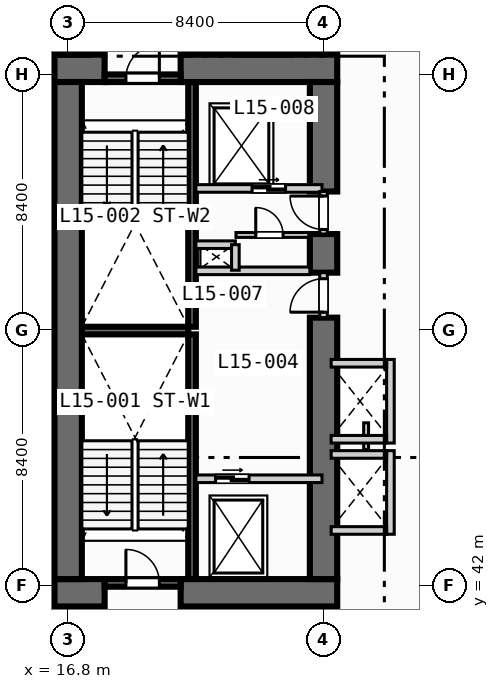
"""IFC4 building model, lengths in metres.
Left out: names, types, materials, properties, quantities, classifications, styles, units other than length and angle.
Written with IfcOpenShell. Run it as: python <this file> out.ifc"""

import sys

from ifc_helpers import new_model, si_unit, direction, frame, frame_2d, origin, place, context, subcontext, project, spatial, rectangle, extrude, element, fill, save


model = new_model("IFC4")
c1 = context("Model", 3, precision=1e-05, world=origin(), true_north=direction((0.0, 1.0)))
c2 = subcontext(c1, "Body", "Model", "MODEL_VIEW")
j1 = project(units=[si_unit("LENGTHUNIT", "METRE"), si_unit("PLANEANGLEUNIT", "RADIAN")], contexts=[c1])
p1 = place(None, origin())
s1 = spatial("IfcSite", under=j1, at=p1, CompositionType="ELEMENT")
p2 = place(p1, origin())
s2 = spatial("IfcBuilding", under=s1, at=p2, CompositionType="ELEMENT")
p3 = place(p2, frame((0.0, 0.0, 66.2)))
s3 = spatial("IfcBuildingStorey", under=s2, at=p3, CompositionType="ELEMENT", Elevation=66.2)
for number, where, z_axis, x_axis in (
    (1, (20.875, 42.2, 0.0), (0.0, 0.0, 1.0), (0.0, 1.0, 0.0)),
    (2, (20.875, 50.5, 0.0), (0.0, 0.0, 1.0), (0.0, 1.0, 0.0)),
):
    element("IfcWall", number, at=place(p3, frame(where, z_axis=z_axis, x_axis=x_axis)), inside=s3, PredefinedType="SOLIDWALL", context=c2, shape_type="SweptSolid", body=[
        extrude(rectangle(XDim=8.05, YDim=0.25, at=frame_2d((4.025, 0.0))), origin(), (0.0, 0.0, 1.0), 3.55),
    ])
p4 = place(p3, frame((17.25, 50.375, 0.0), z_axis=(0.0, 0.0, 1.0), x_axis=(1.0, 0.0, 0.0)))
e3 = element("IfcWall", 3, at=p4, inside=s3, PredefinedType="SOLIDWALL", context=c2, shape_type="SweptSolid", body=[
    extrude(rectangle(XDim=3.5, YDim=0.25, at=frame_2d((1.75, 0.0))), origin(), (0.0, 0.0, 1.0), 3.55),
])
p5 = place(p3, frame((16.35, 41.75, 0.0), z_axis=(0.0, 0.0, 1.0), x_axis=(1.0, 0.0, 0.0)))
e4 = element("IfcWall", 4, at=p5, inside=s3, PredefinedType="SHEAR", context=c2, shape_type="SweptSolid", body=[
    extrude(rectangle(XDim=1.65, YDim=0.9, at=frame_2d((0.825, 0.0))), origin(), (0.0, 0.0, 1.0), 3.55),
])
p6 = place(p3, frame((20.5, 41.75, 0.0), z_axis=(0.0, 0.0, 1.0), x_axis=(1.0, 0.0, 0.0)))
e5 = element("IfcWall", 5, at=p6, inside=s3, PredefinedType="SHEAR", context=c2, shape_type="SweptSolid", body=[
    extrude(rectangle(XDim=5.15, YDim=0.9, at=frame_2d((2.575, 0.0))), origin(), (0.0, 0.0, 1.0), 3.55),
])
p7 = place(p3, frame((16.35, 59.0, 0.0), z_axis=(0.0, 0.0, 1.0), x_axis=(1.0, 0.0, 0.0)))
e6 = element("IfcWall", 6, at=p7, inside=s3, PredefinedType="SHEAR", context=c2, shape_type="SweptSolid", body=[
    extrude(rectangle(XDim=1.65, YDim=0.9, at=frame_2d((0.825, 0.0))), origin(), (0.0, 0.0, 1.0), 3.55),
])
p8 = place(p3, frame((20.5, 59.0, 0.0), z_axis=(0.0, 0.0, 1.0), x_axis=(1.0, 0.0, 0.0)))
e7 = element("IfcWall", 7, at=p8, inside=s3, PredefinedType="SHEAR", context=c2, shape_type="SweptSolid", body=[
    extrude(rectangle(XDim=5.15, YDim=0.9, at=frame_2d((2.575, 0.0))), origin(), (0.0, 0.0, 1.0), 3.55),
])
p9 = place(p3, frame((16.8, 42.2, 0.0), z_axis=(0.0, 0.0, 1.0), x_axis=(0.0, 1.0, 0.0)))
e8 = element("IfcWall", 8, at=p9, inside=s3, PredefinedType="SHEAR", context=c2, shape_type="SweptSolid", body=[
    extrude(rectangle(XDim=16.35, YDim=0.9, at=frame_2d((8.175, 0.0))), origin(), (0.0, 0.0, 1.0), 3.55),
])
p10 = place(p3, frame((25.2, 42.2, 0.0), z_axis=(0.0, 0.0, 1.0), x_axis=(0.0, 1.0, 0.0)))
e9 = element("IfcWall", 9, at=p10, inside=s3, PredefinedType="SHEAR", context=c2, shape_type="SweptSolid", body=[
    extrude(rectangle(XDim=8.6, YDim=0.9, at=frame_2d((4.3, 0.0))), origin(), (0.0, 0.0, 1.0), 3.55),
])
p11 = place(p3, frame((25.2, 52.28, 0.0), z_axis=(0.0, 0.0, 1.0), x_axis=(0.0, 1.0, 0.0)))
e10 = element("IfcWall", 10, at=p11, inside=s3, PredefinedType="SHEAR", context=c2, shape_type="SweptSolid", body=[
    extrude(rectangle(XDim=1.27, YDim=0.9, at=frame_2d((0.635, 0.0))), origin(), (0.0, 0.0, 1.0), 3.55),
])
p12 = place(p3, frame((25.2, 54.95, 0.0), z_axis=(0.0, 0.0, 1.0), x_axis=(0.0, 1.0, 0.0)))
e11 = element("IfcWall", 11, at=p12, inside=s3, PredefinedType="SHEAR", context=c2, shape_type="SweptSolid", body=[
    extrude(rectangle(XDim=3.6, YDim=0.9, at=frame_2d((1.8, 0.0))), origin(), (0.0, 0.0, 1.0), 3.55),
])
p13 = place(p3, frame((18.0, 42.075, 0.0), z_axis=(0.0, 0.0, 1.0), x_axis=(1.0, 0.0, 0.0)))
e12 = element("IfcWall", 12, at=p13, inside=s3, PredefinedType="SOLIDWALL", context=c2, shape_type="SweptSolid", body=[
    extrude(rectangle(XDim=2.5, YDim=0.25, at=frame_2d((1.25, 0.0))), origin(), (0.0, 0.0, 1.0), 3.55),
])
p14 = place(p13, frame((0.7, 0.0, 0.0)))
e13 = element("IfcOpeningElement", 13, at=p14, cuts=e12, PredefinedType="OPENING", context=c2, shape_type="SweptSolid", body=[
    extrude(rectangle(XDim=1.1, YDim=2.15, at=frame_2d((0.55, 1.075))), frame((0.0, 0.135, 0.0), z_axis=(0.0, -1.0, 0.0), x_axis=(1.0, 0.0, 0.0)), (0.0, 0.0, 1.0), 0.27),
])
p15 = place(p3, frame((18.0, 58.675, 0.0), z_axis=(0.0, 0.0, 1.0), x_axis=(1.0, 0.0, 0.0)))
e14 = element("IfcWall", 14, at=p15, inside=s3, PredefinedType="SOLIDWALL", context=c2, shape_type="SweptSolid", body=[
    extrude(rectangle(XDim=2.5, YDim=0.25, at=frame_2d((1.25, 0.0))), origin(), (0.0, 0.0, 1.0), 3.55),
])
p16 = place(p15, frame((0.7, 0.0, 0.0)))
e15 = element("IfcOpeningElement", 15, at=p16, cuts=e14, PredefinedType="OPENING", context=c2, shape_type="SweptSolid", body=[
    extrude(rectangle(XDim=1.1, YDim=2.15, at=frame_2d((0.55, 1.075))), frame((0.0, 0.135, 0.0), z_axis=(0.0, -1.0, 0.0), x_axis=(1.0, 0.0, 0.0)), (0.0, 0.0, 1.0), 0.27),
])
p17 = place(p3, frame((21.0, 45.5, 0.0), z_axis=(0.0, 0.0, 1.0), x_axis=(1.0, 0.0, 0.0)))
e16 = element("IfcWall", 16, at=p17, inside=s3, PredefinedType="SOLIDWALL", context=c2, shape_type="SweptSolid", body=[
    extrude(rectangle(XDim=4.15, YDim=0.25, at=frame_2d((2.075, 0.0))), origin(), (0.0, 0.0, 1.0), 3.55),
])
p18 = place(p17, frame((0.65, 0.0, 0.0)))
e17 = element("IfcOpeningElement", 17, at=p18, cuts=e16, PredefinedType="OPENING", context=c2, shape_type="SweptSolid", body=[
    extrude(rectangle(XDim=1.1, YDim=2.15, at=frame_2d((0.55, 1.075))), frame((0.0, 0.135, 0.0), z_axis=(0.0, -1.0, 0.0), x_axis=(1.0, 0.0, 0.0)), (0.0, 0.0, 1.0), 0.27),
])
p19 = place(p3, frame((25.2, 50.8, 0.0), z_axis=(0.0, 0.0, 1.0), x_axis=(0.0, 1.0, 0.0)))
e18 = element("IfcWall", 18, at=p19, inside=s3, PredefinedType="SOLIDWALL", context=c2, shape_type="SweptSolid", body=[
    extrude(rectangle(XDim=1.48, YDim=0.25, at=frame_2d((0.74, 0.0))), origin(), (0.0, 0.0, 1.0), 3.55),
])
p20 = place(p19, frame((0.18, 0.0, 0.0)))
e19 = element("IfcOpeningElement", 19, at=p20, cuts=e18, PredefinedType="OPENING", context=c2, shape_type="SweptSolid", body=[
    extrude(rectangle(XDim=1.1, YDim=2.15, at=frame_2d((0.55, 1.075))), frame((0.0, 0.135, 0.0), z_axis=(0.0, -1.0, 0.0), x_axis=(1.0, 0.0, 0.0)), (0.0, 0.0, 1.0), 0.27),
])
p21 = place(p3, frame((21.0, 52.34, 0.0), z_axis=(0.0, 0.0, 1.0), x_axis=(1.0, 0.0, 0.0)))
e20 = element("IfcWall", 20, at=p21, inside=s3, PredefinedType="SOLIDWALL", context=c2, shape_type="SweptSolid", body=[
    extrude(rectangle(XDim=3.75, YDim=0.25, at=frame_2d((1.875, 0.0))), origin(), (0.0, 0.0, 1.0), 3.55),
])
p22 = place(p3, frame((21.0, 55.05, 0.0), z_axis=(0.0, 0.0, 1.0), x_axis=(1.0, 0.0, 0.0)))
e21 = element("IfcWall", 21, at=p22, inside=s3, PredefinedType="SOLIDWALL", context=c2, shape_type="SweptSolid", body=[
    extrude(rectangle(XDim=4.15, YDim=0.25, at=frame_2d((2.075, 0.0))), origin(), (0.0, 0.0, 1.0), 3.55),
])
p23 = place(p22, frame((1.85, 0.0, 0.0)))
e22 = element("IfcOpeningElement", 22, at=p23, cuts=e21, PredefinedType="OPENING", context=c2, shape_type="SweptSolid", body=[
    extrude(rectangle(XDim=1.1, YDim=2.15, at=frame_2d((0.55, 1.075))), frame((0.0, 0.135, 0.0), z_axis=(0.0, -1.0, 0.0), x_axis=(1.0, 0.0, 0.0)), (0.0, 0.0, 1.0), 0.27),
])
p24 = place(p3, frame((25.2, 53.55, 0.0), z_axis=(0.0, 0.0, 1.0), x_axis=(0.0, 1.0, 0.0)))
e23 = element("IfcWall", 23, at=p24, inside=s3, PredefinedType="SOLIDWALL", context=c2, shape_type="SweptSolid", body=[
    extrude(rectangle(XDim=1.4, YDim=0.25, at=frame_2d((0.7, 0.0))), origin(), (0.0, 0.0, 1.0), 3.55),
])
p25 = place(p24, frame((0.15, 0.0, 0.0)))
e24 = element("IfcOpeningElement", 24, at=p25, cuts=e23, PredefinedType="OPENING", context=c2, shape_type="SweptSolid", body=[
    extrude(rectangle(XDim=1.1, YDim=2.15, at=frame_2d((0.55, 1.075))), frame((0.0, 0.135, 0.0), z_axis=(0.0, -1.0, 0.0), x_axis=(1.0, 0.0, 0.0)), (0.0, 0.0, 1.0), 0.27),
])
p26 = place(p3, frame((21.0, 53.2, 0.0), z_axis=(0.0, 0.0, 1.0), x_axis=(1.0, 0.0, 0.0)))
e25 = element("IfcWall", 25, at=p26, inside=s3, PredefinedType="SOLIDWALL", context=c2, shape_type="SweptSolid", body=[
    extrude(rectangle(XDim=1.3, YDim=0.25, at=frame_2d((0.65, 0.0))), origin(), (0.0, 0.0, 1.0), 3.55),
])
p27 = place(p3, frame((22.3, 52.36, 0.0), z_axis=(0.0, 0.0, 1.0), x_axis=(0.0, 1.0, 0.0)))
e26 = element("IfcWall", 26, at=p27, inside=s3, PredefinedType="SOLIDWALL", context=c2, shape_type="SweptSolid", body=[
    extrude(rectangle(XDim=0.84, YDim=0.25, at=frame_2d((0.42, 0.0))), origin(), (0.0, 0.0, 1.0), 3.55),
])
p28 = place(p3, frame((22.32, 53.52, 0.0), z_axis=(0.0, 0.0, 1.0), x_axis=(1.0, 0.0, 0.0)))
e27 = element("IfcWall", 27, at=p28, inside=s3, PredefinedType="PARTITIONING", context=c2, shape_type="SweptSolid", body=[
    extrude(rectangle(XDim=2.4, YDim=0.16, at=frame_2d((1.2, 0.0))), origin(), (0.0, 0.0, 1.0), 3.55),
])
p29 = place(p28, frame((0.65, 0.0, 0.0)))
e28 = element("IfcOpeningElement", 28, at=p29, cuts=e27, PredefinedType="OPENING", context=c2, shape_type="SweptSolid", body=[
    extrude(rectangle(XDim=0.9, YDim=2.1, at=frame_2d((0.45, 1.05))), frame((0.0, 0.09, 0.0), z_axis=(0.0, -1.0, 0.0), x_axis=(1.0, 0.0, 0.0)), (0.0, 0.0, 1.0), 0.18),
])
p30 = place(p3, frame((27.4, 43.675, 0.0), z_axis=(0.0, 0.0, 1.0), x_axis=(0.0, 1.0, 0.0)))
e29 = element("IfcWall", 29, at=p30, inside=s3, PredefinedType="SOLIDWALL", context=c2, shape_type="SweptSolid", body=[
    extrude(rectangle(XDim=2.75, YDim=0.25, at=frame_2d((1.375, 0.0))), origin(), (0.0, 0.0, 1.0), 3.55),
])
for number, where, z_axis, x_axis in (
    (30, (25.45, 43.8, 0.0), (0.0, 0.0, 1.0), (1.0, 0.0, 0.0)),
    (31, (25.45, 46.3, 0.0), (0.0, 0.0, 1.0), (1.0, 0.0, 0.0)),
):
    element("IfcWall", number, at=place(p3, frame(where, z_axis=z_axis, x_axis=x_axis)), inside=s3, PredefinedType="SOLIDWALL", context=c2, shape_type="SweptSolid", body=[
        extrude(rectangle(XDim=1.825, YDim=0.25, at=frame_2d((0.913, 0.0))), origin(), (0.0, 0.0, 1.0), 3.55),
    ])
p31 = place(p3, frame((26.6, 46.46, 0.0), z_axis=(0.0, 0.0, 1.0), x_axis=(0.0, 1.0, 0.0)))
e32 = element("IfcWall", 32, at=p31, inside=s3, PredefinedType="PARTITIONING", context=c2, shape_type="SweptSolid", body=[
    extrude(rectangle(XDim=0.88, YDim=0.16, at=frame_2d((0.44, 0.0))), origin(), (0.0, 0.0, 1.0), 3.55),
])
p32 = place(p3, frame((27.4, 46.675, 0.0), z_axis=(0.0, 0.0, 1.0), x_axis=(0.0, 1.0, 0.0)))
e33 = element("IfcWall", 33, at=p32, inside=s3, PredefinedType="SOLIDWALL", context=c2, shape_type="SweptSolid", body=[
    extrude(rectangle(XDim=2.75, YDim=0.25, at=frame_2d((1.375, 0.0))), origin(), (0.0, 0.0, 1.0), 3.55),
])
for number, where, z_axis, x_axis in (
    (34, (25.45, 46.8, 0.0), (0.0, 0.0, 1.0), (1.0, 0.0, 0.0)),
    (35, (25.45, 49.3, 0.0), (0.0, 0.0, 1.0), (1.0, 0.0, 0.0)),
):
    element("IfcWall", number, at=place(p3, frame(where, z_axis=z_axis, x_axis=x_axis)), inside=s3, PredefinedType="SOLIDWALL", context=c2, shape_type="SweptSolid", body=[
        extrude(rectangle(XDim=1.825, YDim=0.25, at=frame_2d((0.913, 0.0))), origin(), (0.0, 0.0, 1.0), 3.55),
    ])
p33 = place(p14, origin())
e36 = element("IfcDoor", 36, at=p33, inside=s3, OperationType="SINGLE_SWING_LEFT", PredefinedType="DOOR", context=c2, shape_type="SweptSolid", body=[
    extrude(rectangle(XDim=1.1, YDim=2.15, at=frame_2d((0.55, 1.075))), frame((0.0, 0.025, 0.0), z_axis=(0.0, -1.0, 0.0), x_axis=(1.0, 0.0, 0.0)), (0.0, 0.0, 1.0), 0.05),
])
fill(e13, e36)
p34 = place(p16, origin())
e37 = element("IfcDoor", 37, at=p34, inside=s3, OperationType="SINGLE_SWING_RIGHT", PredefinedType="DOOR", context=c2, shape_type="SweptSolid", body=[
    extrude(rectangle(XDim=1.1, YDim=2.15, at=frame_2d((0.55, 1.075))), frame((0.0, 0.025, 0.0), z_axis=(0.0, -1.0, 0.0), x_axis=(1.0, 0.0, 0.0)), (0.0, 0.0, 1.0), 0.05),
])
fill(e15, e37)
p35 = place(p18, origin())
e38 = element("IfcDoor", 38, at=p35, inside=s3, OperationType="SLIDING_TO_LEFT", PredefinedType="DOOR", context=c2, shape_type="SweptSolid", body=[
    extrude(rectangle(XDim=1.1, YDim=2.15, at=frame_2d((0.55, 1.075))), frame((0.0, 0.025, 0.0), z_axis=(0.0, -1.0, 0.0), x_axis=(1.0, 0.0, 0.0)), (0.0, 0.0, 1.0), 0.05),
])
fill(e17, e38)
p36 = place(p20, origin())
e39 = element("IfcDoor", 39, at=p36, inside=s3, OperationType="SINGLE_SWING_LEFT", PredefinedType="DOOR", context=c2, shape_type="SweptSolid", body=[
    extrude(rectangle(XDim=1.1, YDim=2.15, at=frame_2d((0.55, 1.075))), frame((0.0, 0.025, 0.0), z_axis=(0.0, -1.0, 0.0), x_axis=(1.0, 0.0, 0.0)), (0.0, 0.0, 1.0), 0.05),
])
fill(e19, e39)
p37 = place(p23, origin())
e40 = element("IfcDoor", 40, at=p37, inside=s3, OperationType="SLIDING_TO_LEFT", PredefinedType="DOOR", context=c2, shape_type="SweptSolid", body=[
    extrude(rectangle(XDim=1.1, YDim=2.15, at=frame_2d((0.55, 1.075))), frame((0.0, 0.025, 0.0), z_axis=(0.0, -1.0, 0.0), x_axis=(1.0, 0.0, 0.0)), (0.0, 0.0, 1.0), 0.05),
])
fill(e22, e40)
p38 = place(p25, origin())
e41 = element("IfcDoor", 41, at=p38, inside=s3, OperationType="SINGLE_SWING_RIGHT", PredefinedType="DOOR", context=c2, shape_type="SweptSolid", body=[
    extrude(rectangle(XDim=1.1, YDim=2.15, at=frame_2d((0.55, 1.075))), frame((0.0, 0.025, 0.0), z_axis=(0.0, -1.0, 0.0), x_axis=(1.0, 0.0, 0.0)), (0.0, 0.0, 1.0), 0.05),
])
fill(e24, e41)
p39 = place(p29, origin())
e42 = element("IfcDoor", 42, at=p39, inside=s3, OperationType="SINGLE_SWING_LEFT", PredefinedType="DOOR", context=c2, shape_type="SweptSolid", body=[
    extrude(rectangle(XDim=0.9, YDim=2.1, at=frame_2d((0.45, 1.05))), frame((0.0, 0.025, 0.0), z_axis=(0.0, -1.0, 0.0), x_axis=(1.0, 0.0, 0.0)), (0.0, 0.0, 1.0), 0.05),
])
fill(e28, e42)
save(model, sys.argv[1])
